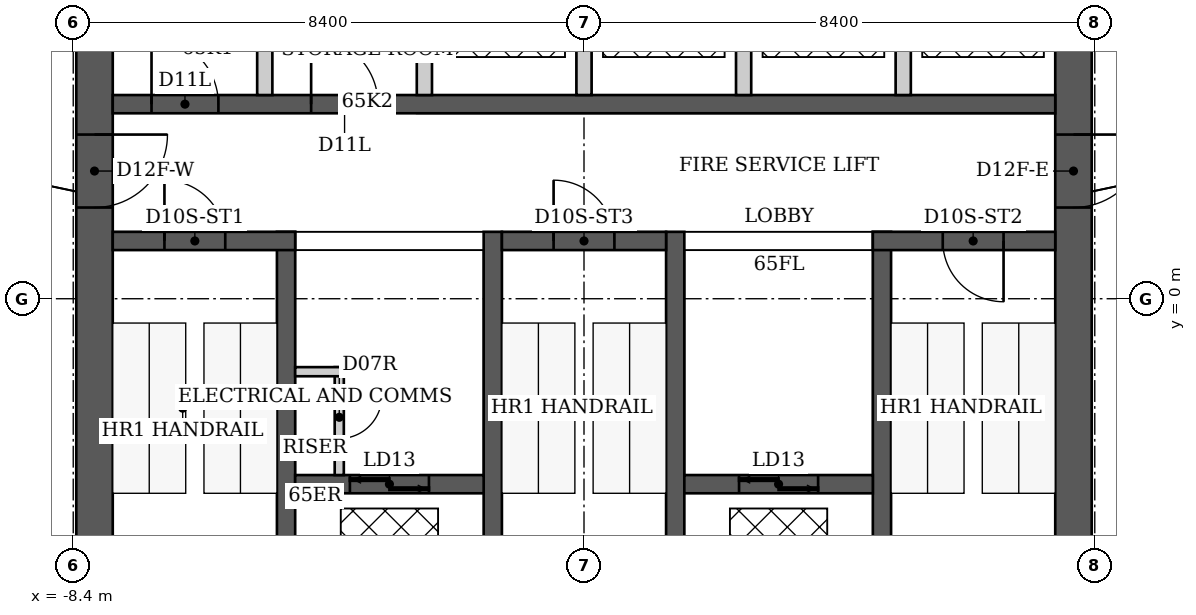
"""IFC4 building model, lengths in metres.
Left out: names, types, materials, properties, quantities, classifications, styles, units other than length and angle.
Written with IfcOpenShell. Run it as: python <this file> out.ifc"""

import sys

from ifc_helpers import new_model, si_unit, direction, frame, frame_2d, origin, place, context, subcontext, project, spatial, rectangle, extrude, element, fill, save


model = new_model("IFC4")
c1 = context("Model", 3, precision=1e-05, world=origin(), true_north=direction((0.0, 1.0)))
c2 = subcontext(c1, "Body", "Model", "MODEL_VIEW")
j1 = project(units=[si_unit("LENGTHUNIT", "METRE"), si_unit("PLANEANGLEUNIT", "RADIAN")], contexts=[c1])
p1 = place(None, origin())
s1 = spatial("IfcSite", under=j1, at=p1, CompositionType="ELEMENT")
p2 = place(p1, origin())
s2 = spatial("IfcBuilding", under=s1, at=p2, CompositionType="ELEMENT")
p3 = place(p2, frame((0.0, 0.0, 260.8)))
s3 = spatial("IfcBuildingStorey", under=s2, at=p3, CompositionType="ELEMENT", Elevation=260.8)
p4 = place(p3, frame((-8.05, -6.1, 0.0), z_axis=(0.0, 0.0, 1.0), x_axis=(0.0, 1.0, 0.0)))
e1 = element("IfcWall", 1, at=p4, inside=s3, PredefinedType="SHEAR", context=c2, shape_type="SweptSolid", body=[
    extrude(rectangle(XDim=12.2, YDim=0.6, at=frame_2d((6.1, 0.0))), origin(), (0.0, 0.0, 1.0), 3.8),
])
p5 = place(p4, frame((7.6, 0.0, 0.0)))
e2 = element("IfcOpeningElement", 2, at=p5, cuts=e1, PredefinedType="OPENING", context=c2, shape_type="SweptSolid", body=[
    extrude(rectangle(XDim=1.2, YDim=2.2, at=frame_2d((0.6, 1.1))), frame((0.0, 0.3, 0.0), z_axis=(0.0, -1.0, 0.0), x_axis=(1.0, 0.0, 0.0)), (0.0, 0.0, 1.0), 0.6),
])
p6 = place(p3, frame((8.05, -6.1, 0.0), z_axis=(0.0, 0.0, 1.0), x_axis=(0.0, 1.0, 0.0)))
e3 = element("IfcWall", 3, at=p6, inside=s3, PredefinedType="SHEAR", context=c2, shape_type="SweptSolid", body=[
    extrude(rectangle(XDim=12.2, YDim=0.6, at=frame_2d((6.1, 0.0))), origin(), (0.0, 0.0, 1.0), 3.8),
])
p7 = place(p6, frame((7.6, 0.0, 0.0)))
e4 = element("IfcOpeningElement", 4, at=p7, cuts=e3, PredefinedType="OPENING", context=c2, shape_type="SweptSolid", body=[
    extrude(rectangle(XDim=1.2, YDim=2.2, at=frame_2d((0.6, 1.1))), frame((0.0, 0.3, 0.0), z_axis=(0.0, -1.0, 0.0), x_axis=(1.0, 0.0, 0.0)), (0.0, 0.0, 1.0), 0.6),
])
for number, where, z_axis, x_axis in (
    (5, (-4.9, -6.1, 0.0), (0.0, 0.0, 1.0), (0.0, 1.0, 0.0)),
    (6, (-1.5, -6.1, 0.0), (0.0, 0.0, 1.0), (0.0, 1.0, 0.0)),
    (7, (1.5, -6.1, 0.0), (0.0, 0.0, 1.0), (0.0, 1.0, 0.0)),
    (8, (4.9, -6.1, 0.0), (0.0, 0.0, 1.0), (0.0, 1.0, 0.0)),
):
    element("IfcWall", number, at=place(p3, frame(where, z_axis=z_axis, x_axis=x_axis)), inside=s3, PredefinedType="SHEAR", context=c2, shape_type="SweptSolid", body=[
        extrude(rectangle(XDim=7.2, YDim=0.3, at=frame_2d((3.6, 0.0))), origin(), (0.0, 0.0, 1.0), 3.8),
    ])
p8 = place(p3, frame((-7.75, 0.95, 0.0), z_axis=(0.0, 0.0, 1.0), x_axis=(1.0, 0.0, 0.0)))
e9 = element("IfcWall", 9, at=p8, inside=s3, PredefinedType="SHEAR", context=c2, shape_type="SweptSolid", body=[
    extrude(rectangle(XDim=3.0, YDim=0.3, at=frame_2d((1.5, 0.0))), origin(), (0.0, 0.0, 1.0), 3.8),
])
p9 = place(p8, frame((0.85, 0.0, 0.0)))
e10 = element("IfcOpeningElement", 10, at=p9, cuts=e9, PredefinedType="OPENING", context=c2, shape_type="SweptSolid", body=[
    extrude(rectangle(XDim=1.0, YDim=2.2, at=frame_2d((0.5, 1.1))), frame((0.0, 0.15, 0.0), z_axis=(0.0, -1.0, 0.0), x_axis=(1.0, 0.0, 0.0)), (0.0, 0.0, 1.0), 0.3),
])
p10 = place(p3, frame((-1.35, 0.95, 0.0), z_axis=(0.0, 0.0, 1.0), x_axis=(1.0, 0.0, 0.0)))
e11 = element("IfcWall", 11, at=p10, inside=s3, PredefinedType="SHEAR", context=c2, shape_type="SweptSolid", body=[
    extrude(rectangle(XDim=2.7, YDim=0.3, at=frame_2d((1.35, 0.0))), origin(), (0.0, 0.0, 1.0), 3.8),
])
p11 = place(p10, frame((0.85, 0.0, 0.0)))
e12 = element("IfcOpeningElement", 12, at=p11, cuts=e11, PredefinedType="OPENING", context=c2, shape_type="SweptSolid", body=[
    extrude(rectangle(XDim=1.0, YDim=2.2, at=frame_2d((0.5, 1.1))), frame((0.0, 0.15, 0.0), z_axis=(0.0, -1.0, 0.0), x_axis=(1.0, 0.0, 0.0)), (0.0, 0.0, 1.0), 0.3),
])
p12 = place(p3, frame((4.75, 0.95, 0.0), z_axis=(0.0, 0.0, 1.0), x_axis=(1.0, 0.0, 0.0)))
e13 = element("IfcWall", 13, at=p12, inside=s3, PredefinedType="SHEAR", context=c2, shape_type="SweptSolid", body=[
    extrude(rectangle(XDim=3.0, YDim=0.3, at=frame_2d((1.5, 0.0))), origin(), (0.0, 0.0, 1.0), 3.8),
])
p13 = place(p12, frame((1.15, 0.0, 0.0)))
e14 = element("IfcOpeningElement", 14, at=p13, cuts=e13, PredefinedType="OPENING", context=c2, shape_type="SweptSolid", body=[
    extrude(rectangle(XDim=1.0, YDim=2.2, at=frame_2d((0.5, 1.1))), frame((0.0, 0.15, 0.0), z_axis=(0.0, -1.0, 0.0), x_axis=(1.0, 0.0, 0.0)), (0.0, 0.0, 1.0), 0.3),
])
p14 = place(p3, frame((-4.75, -3.05, 0.0), z_axis=(0.0, 0.0, 1.0), x_axis=(1.0, 0.0, 0.0)))
e15 = element("IfcWall", 15, at=p14, inside=s3, PredefinedType="SHEAR", context=c2, shape_type="SweptSolid", body=[
    extrude(rectangle(XDim=3.1, YDim=0.3, at=frame_2d((1.55, 0.0))), origin(), (0.0, 0.0, 1.0), 3.8),
])
p15 = place(p14, frame((0.9, 0.0, 0.0)))
e16 = element("IfcOpeningElement", 16, at=p15, cuts=e15, PredefinedType="OPENING", context=c2, shape_type="SweptSolid", body=[
    extrude(rectangle(XDim=1.3, YDim=2.1, at=frame_2d((0.65, 1.05))), frame((0.0, 0.15, 0.0), z_axis=(0.0, -1.0, 0.0), x_axis=(1.0, 0.0, 0.0)), (0.0, 0.0, 1.0), 0.3),
])
p16 = place(p3, frame((1.65, -3.05, 0.0), z_axis=(0.0, 0.0, 1.0), x_axis=(1.0, 0.0, 0.0)))
e17 = element("IfcWall", 17, at=p16, inside=s3, PredefinedType="SHEAR", context=c2, shape_type="SweptSolid", body=[
    extrude(rectangle(XDim=3.1, YDim=0.3, at=frame_2d((1.55, 0.0))), origin(), (0.0, 0.0, 1.0), 3.8),
])
p17 = place(p16, frame((0.9, 0.0, 0.0)))
e18 = element("IfcOpeningElement", 18, at=p17, cuts=e17, PredefinedType="OPENING", context=c2, shape_type="SweptSolid", body=[
    extrude(rectangle(XDim=1.3, YDim=2.1, at=frame_2d((0.65, 1.05))), frame((0.0, 0.15, 0.0), z_axis=(0.0, -1.0, 0.0), x_axis=(1.0, 0.0, 0.0)), (0.0, 0.0, 1.0), 0.3),
])
p18 = place(p3, frame((-7.75, 3.2, 0.0), z_axis=(0.0, 0.0, 1.0), x_axis=(1.0, 0.0, 0.0)))
e19 = element("IfcWall", 19, at=p18, inside=s3, PredefinedType="SHEAR", context=c2, shape_type="SweptSolid", body=[
    extrude(rectangle(XDim=15.5, YDim=0.3, at=frame_2d((7.75, 0.0))), origin(), (0.0, 0.0, 1.0), 3.8),
])
p19 = place(p18, frame((0.637, 0.0, 0.0)))
e20 = element("IfcOpeningElement", 20, at=p19, cuts=e19, PredefinedType="OPENING", context=c2, shape_type="SweptSolid", body=[
    extrude(rectangle(XDim=1.1, YDim=2.2, at=frame_2d((0.55, 1.1))), frame((0.0, 0.15, 0.0), z_axis=(0.0, -1.0, 0.0), x_axis=(1.0, 0.0, 0.0)), (0.0, 0.0, 1.0), 0.3),
])
p20 = place(p18, frame((3.262, 0.0, 0.0)))
e21 = element("IfcOpeningElement", 21, at=p20, cuts=e19, PredefinedType="OPENING", context=c2, shape_type="SweptSolid", body=[
    extrude(rectangle(XDim=1.1, YDim=2.2, at=frame_2d((0.55, 1.1))), frame((0.0, 0.15, 0.0), z_axis=(0.0, -1.0, 0.0), x_axis=(1.0, 0.0, 0.0)), (0.0, 0.0, 1.0), 0.3),
])
for number, where, z_axis, x_axis in (
    (22, (-5.25, 3.35, 0.0), (0.0, 0.0, 1.0), (0.0, 1.0, 0.0)),
    (23, (-2.625, 3.35, 0.0), (0.0, 0.0, 1.0), (0.0, 1.0, 0.0)),
    (24, (0.0, 3.35, 0.0), (0.0, 0.0, 1.0), (0.0, 1.0, 0.0)),
    (25, (2.625, 3.35, 0.0), (0.0, 0.0, 1.0), (0.0, 1.0, 0.0)),
    (26, (5.25, 3.35, 0.0), (0.0, 0.0, 1.0), (0.0, 1.0, 0.0)),
):
    element("IfcWall", number, at=place(p3, frame(where, z_axis=z_axis, x_axis=x_axis)), inside=s3, PredefinedType="PARTITIONING", context=c2, shape_type="SweptSolid", body=[
        extrude(rectangle(XDim=2.75, YDim=0.25, at=frame_2d((1.375, 0.0))), origin(), (0.0, 0.0, 1.0), 3.8),
    ])
p21 = place(p3, frame((-4.025, -2.9, 0.0), z_axis=(0.0, 0.0, 1.0), x_axis=(0.0, 1.0, 0.0)))
e27 = element("IfcWall", 27, at=p21, inside=s3, PredefinedType="PARTITIONING", context=c2, shape_type="SweptSolid", body=[
    extrude(rectangle(XDim=1.775, YDim=0.15, at=frame_2d((0.887, 0.0))), origin(), (0.0, 0.0, 1.0), 3.64),
])
p22 = place(p21, frame((0.6, 0.0, 0.0)))
e28 = element("IfcOpeningElement", 28, at=p22, cuts=e27, PredefinedType="OPENING", context=c2, shape_type="SweptSolid", body=[
    extrude(rectangle(XDim=0.7, YDim=2.1, at=frame_2d((0.35, 1.05))), frame((0.0, 0.075, 0.0), z_axis=(0.0, -1.0, 0.0), x_axis=(1.0, 0.0, 0.0)), (0.0, 0.0, 1.0), 0.15),
])
p23 = place(p3, frame((-4.75, -1.2, 0.0), z_axis=(0.0, 0.0, 1.0), x_axis=(1.0, 0.0, 0.0)))
e29 = element("IfcWall", 29, at=p23, inside=s3, PredefinedType="PARTITIONING", context=c2, shape_type="SweptSolid", body=[
    extrude(rectangle(XDim=0.8, YDim=0.15, at=frame_2d((0.4, 0.0))), origin(), (0.0, 0.0, 1.0), 3.64),
])
p24 = place(p9, origin())
e30 = element("IfcDoor", 30, at=p24, inside=s3, OperationType="SINGLE_SWING_LEFT", PredefinedType="DOOR", context=c2, shape_type="SweptSolid", body=[
    extrude(rectangle(XDim=1.0, YDim=2.2, at=frame_2d((0.5, 1.1))), frame((0.0, 0.025, 0.0), z_axis=(0.0, -1.0, 0.0), x_axis=(1.0, 0.0, 0.0)), (0.0, 0.0, 1.0), 0.05),
])
fill(e10, e30)
p25 = place(p11, origin())
e31 = element("IfcDoor", 31, at=p25, inside=s3, OperationType="SINGLE_SWING_LEFT", PredefinedType="DOOR", context=c2, shape_type="SweptSolid", body=[
    extrude(rectangle(XDim=1.0, YDim=2.2, at=frame_2d((0.5, 1.1))), frame((0.0, 0.025, 0.0), z_axis=(0.0, -1.0, 0.0), x_axis=(1.0, 0.0, 0.0)), (0.0, 0.0, 1.0), 0.05),
])
fill(e12, e31)
p26 = place(p13, origin())
e32 = element("IfcDoor", 32, at=p26, inside=s3, OperationType="SINGLE_SWING_RIGHT", PredefinedType="DOOR", context=c2, shape_type="SweptSolid", body=[
    extrude(rectangle(XDim=1.0, YDim=2.2, at=frame_2d((0.5, 1.1))), frame((0.0, 0.025, 0.0), z_axis=(0.0, -1.0, 0.0), x_axis=(1.0, 0.0, 0.0)), (0.0, 0.0, 1.0), 0.05),
])
fill(e14, e32)
p27 = place(p5, origin())
e33 = element("IfcDoor", 33, at=p27, inside=s3, OperationType="SINGLE_SWING_RIGHT", PredefinedType="DOOR", context=c2, shape_type="SweptSolid", body=[
    extrude(rectangle(XDim=1.2, YDim=2.2, at=frame_2d((0.6, 1.1))), frame((0.0, 0.025, 0.0), z_axis=(0.0, -1.0, 0.0), x_axis=(1.0, 0.0, 0.0)), (0.0, 0.0, 1.0), 0.05),
])
fill(e2, e33)
p28 = place(p7, origin())
e34 = element("IfcDoor", 34, at=p28, inside=s3, OperationType="SINGLE_SWING_RIGHT", PredefinedType="DOOR", context=c2, shape_type="SweptSolid", body=[
    extrude(rectangle(XDim=1.2, YDim=2.2, at=frame_2d((0.6, 1.1))), frame((0.0, 0.025, 0.0), z_axis=(0.0, -1.0, 0.0), x_axis=(1.0, 0.0, 0.0)), (0.0, 0.0, 1.0), 0.05),
])
fill(e4, e34)
p29 = place(p22, origin())
e35 = element("IfcDoor", 35, at=p29, inside=s3, OperationType="SINGLE_SWING_RIGHT", PredefinedType="DOOR", context=c2, shape_type="SweptSolid", body=[
    extrude(rectangle(XDim=0.7, YDim=2.1, at=frame_2d((0.35, 1.05))), frame((0.0, 0.025, 0.0), z_axis=(0.0, -1.0, 0.0), x_axis=(1.0, 0.0, 0.0)), (0.0, 0.0, 1.0), 0.05),
])
fill(e28, e35)
p30 = place(p19, origin())
e36 = element("IfcDoor", 36, at=p30, inside=s3, OperationType="SINGLE_SWING_LEFT", PredefinedType="DOOR", context=c2, shape_type="SweptSolid", body=[
    extrude(rectangle(XDim=1.1, YDim=2.2, at=frame_2d((0.55, 1.1))), frame((0.0, 0.025, 0.0), z_axis=(0.0, -1.0, 0.0), x_axis=(1.0, 0.0, 0.0)), (0.0, 0.0, 1.0), 0.05),
])
fill(e20, e36)
p31 = place(p20, origin())
e37 = element("IfcDoor", 37, at=p31, inside=s3, OperationType="SINGLE_SWING_LEFT", PredefinedType="DOOR", context=c2, shape_type="SweptSolid", body=[
    extrude(rectangle(XDim=1.1, YDim=2.2, at=frame_2d((0.55, 1.1))), frame((0.0, 0.025, 0.0), z_axis=(0.0, -1.0, 0.0), x_axis=(1.0, 0.0, 0.0)), (0.0, 0.0, 1.0), 0.05),
])
fill(e21, e37)
p32 = place(p15, origin())
e38 = element("IfcDoor", 38, at=p32, inside=s3, OperationType="DOUBLE_DOOR_SLIDING", PredefinedType="DOOR", context=c2, shape_type="SweptSolid", body=[
    extrude(rectangle(XDim=1.3, YDim=2.1, at=frame_2d((0.65, 1.05))), frame((0.0, 0.025, 0.0), z_axis=(0.0, -1.0, 0.0), x_axis=(1.0, 0.0, 0.0)), (0.0, 0.0, 1.0), 0.05),
])
fill(e16, e38)
p33 = place(p17, origin())
e39 = element("IfcDoor", 39, at=p33, inside=s3, OperationType="DOUBLE_DOOR_SLIDING", PredefinedType="DOOR", context=c2, shape_type="SweptSolid", body=[
    extrude(rectangle(XDim=1.3, YDim=2.1, at=frame_2d((0.65, 1.05))), frame((0.0, 0.025, 0.0), z_axis=(0.0, -1.0, 0.0), x_axis=(1.0, 0.0, 0.0)), (0.0, 0.0, 1.0), 0.05),
])
fill(e18, e39)
save(model, sys.argv[1])
